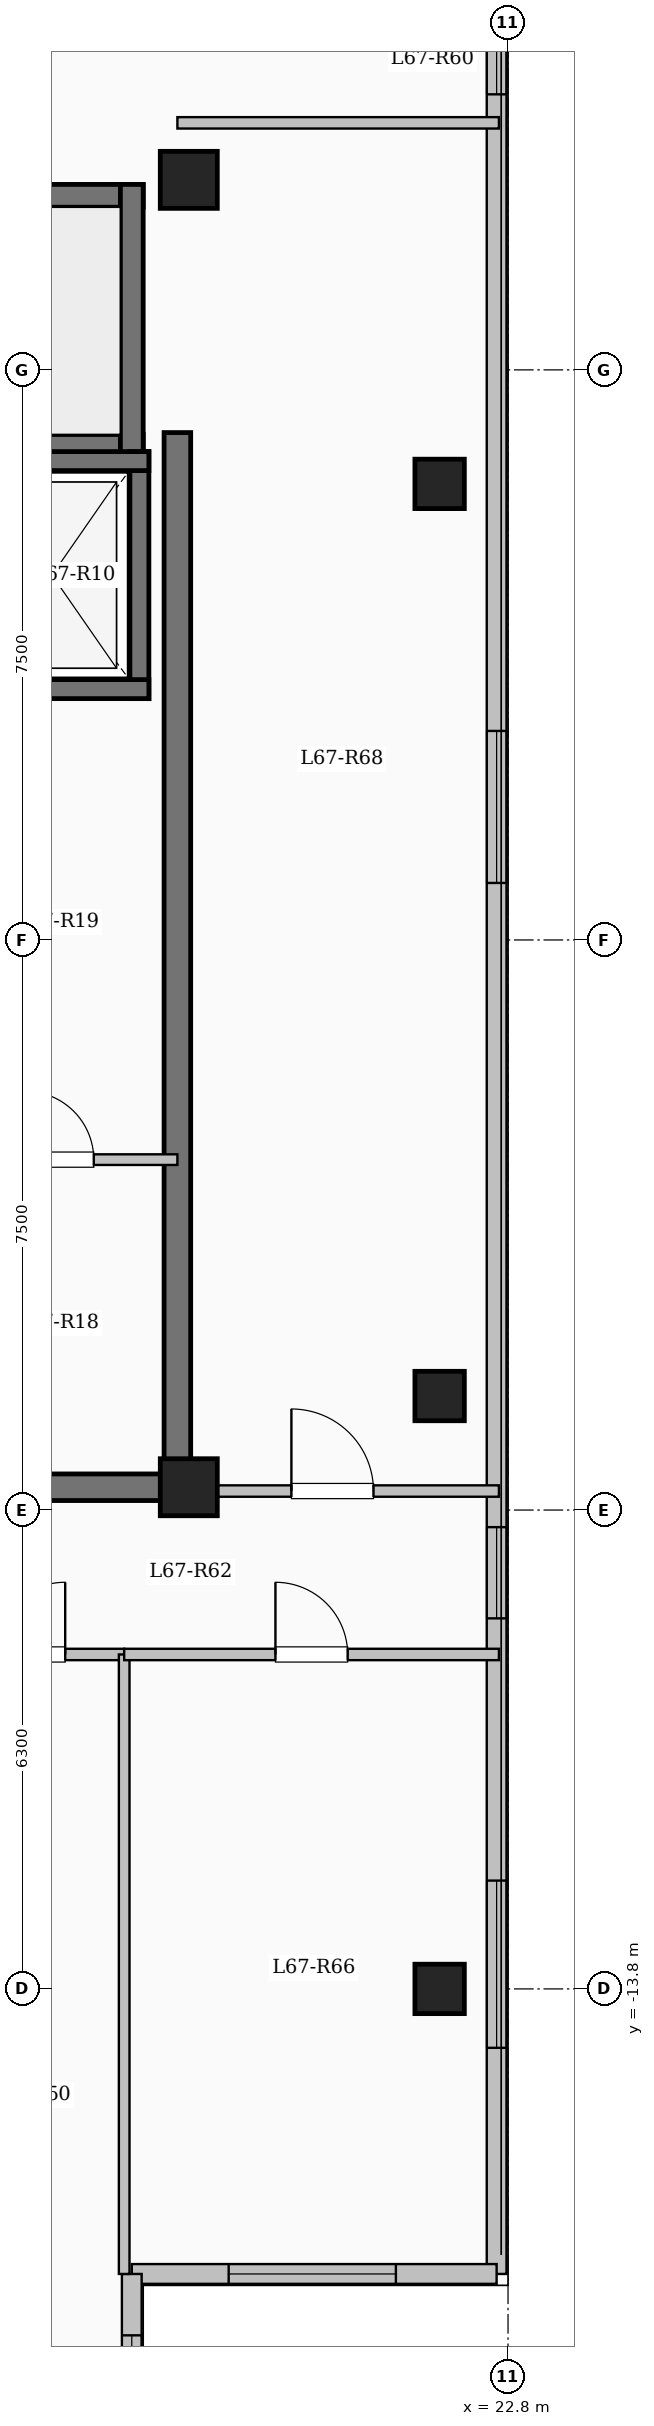
"""IFC4 building model, lengths in metres.
Left out: names, types, materials, properties, quantities, classifications, styles, units other than length and angle.
Written with IfcOpenShell. Run it as: python <this file> out.ifc"""

import sys

from ifc_helpers import new_model, si_unit, direction, frame, frame_2d, origin, origin_2d, place, context, subcontext, project, spatial, rectangle, extrude, element, fill, save


model = new_model("IFC4")
c1 = context("Model", 3, precision=1e-05, world=origin(), true_north=direction((0.0, 1.0)))
c2 = subcontext(c1, "Body", "Model", "MODEL_VIEW")
j1 = project(units=[si_unit("LENGTHUNIT", "METRE"), si_unit("PLANEANGLEUNIT", "RADIAN")], contexts=[c1])
p1 = place(None, origin())
s1 = spatial("IfcSite", under=j1, at=p1, CompositionType="ELEMENT")
p2 = place(p1, origin())
s2 = spatial("IfcBuilding", under=s1, at=p2, CompositionType="ELEMENT")
p3 = place(p2, frame((0.0, 0.0, 248.2)))
s3 = spatial("IfcBuildingStorey", under=s2, at=p3, CompositionType="ELEMENT", Elevation=248.2)
for number, where, z_axis, x_axis in (
    (1, (18.6, -7.2, 0.0), (0.0, 0.0, 1.0), (1.0, 0.0, 0.0)),
    (2, (18.6, 10.0, 0.0), (0.0, 0.0, 1.0), (1.0, 0.0, 0.0)),
):
    element("IfcColumn", number, at=place(p3, frame(where, z_axis=z_axis, x_axis=x_axis)), inside=s3, PredefinedType="COLUMN", context=c2, shape_type="SweptSolid", body=[
        extrude(rectangle(XDim=0.75, YDim=0.75, at=origin_2d()), origin(), (0.0, 0.0, 1.0), 3.35),
    ])
for number, where, z_axis, x_axis in (
    (3, (21.9, -13.8, 0.0), (0.0, 0.0, 1.0), (1.0, 0.0, 0.0)),
    (4, (21.9, -6.0, 0.0), (0.0, 0.0, 1.0), (1.0, 0.0, 0.0)),
    (5, (21.9, 6.0, 0.0), (0.0, 0.0, 1.0), (1.0, 0.0, 0.0)),
):
    element("IfcColumn", number, at=place(p3, frame(where, z_axis=z_axis, x_axis=x_axis)), inside=s3, PredefinedType="COLUMN", context=c2, shape_type="SweptSolid", body=[
        extrude(rectangle(XDim=0.65, YDim=0.65, at=origin_2d()), origin(), (0.0, 0.0, 1.0), 3.35),
    ])
p4 = place(p3, frame((22.65, 17.55, 0.0), z_axis=(0.0, 0.0, 1.0), x_axis=(0.0, -1.0, 0.0)))
e6 = element("IfcWall", 6, at=p4, inside=s3, PredefinedType="SOLIDWALL", context=c2, shape_type="SweptSolid", body=[
    extrude(rectangle(XDim=35.1, YDim=0.26, at=frame_2d((17.55, 0.0))), origin(), (0.0, 0.0, 1.0), 3.1),
])
p5 = place(p4, frame((1.525, 0.0, 0.9)))
e7 = element("IfcOpeningElement", 7, at=p5, cuts=e6, PredefinedType="OPENING", context=c2, shape_type="SweptSolid", body=[
    extrude(rectangle(XDim=2.0, YDim=1.7, at=frame_2d((1.0, 0.85))), frame((0.0, 0.14, 0.0), z_axis=(0.0, -1.0, 0.0), x_axis=(1.0, 0.0, 0.0)), (0.0, 0.0, 1.0), 0.28),
])
p6 = place(p4, frame((5.425, 0.0, 0.95)))
e8 = element("IfcOpeningElement", 8, at=p6, cuts=e6, PredefinedType="OPENING", context=c2, shape_type="SweptSolid", body=[
    extrude(rectangle(XDim=1.0, YDim=1.5, at=frame_2d((0.5, 0.75))), frame((0.0, 0.14, 0.0), z_axis=(0.0, -1.0, 0.0), x_axis=(1.0, 0.0, 0.0)), (0.0, 0.0, 1.0), 0.28),
])
p7 = place(p4, frame((14.8, 0.0, 0.9)))
e9 = element("IfcOpeningElement", 9, at=p7, cuts=e6, PredefinedType="OPENING", context=c2, shape_type="SweptSolid", body=[
    extrude(rectangle(XDim=2.0, YDim=1.7, at=frame_2d((1.0, 0.85))), frame((0.0, 0.14, 0.0), z_axis=(0.0, -1.0, 0.0), x_axis=(1.0, 0.0, 0.0)), (0.0, 0.0, 1.0), 0.28),
])
p8 = place(p4, frame((25.275, 0.0, 0.95)))
e10 = element("IfcOpeningElement", 10, at=p8, cuts=e6, PredefinedType="OPENING", context=c2, shape_type="SweptSolid", body=[
    extrude(rectangle(XDim=1.2, YDim=1.5, at=frame_2d((0.6, 0.75))), frame((0.0, 0.14, 0.0), z_axis=(0.0, -1.0, 0.0), x_axis=(1.0, 0.0, 0.0)), (0.0, 0.0, 1.0), 0.28),
])
p9 = place(p4, frame((29.925, 0.0, 0.9)))
e11 = element("IfcOpeningElement", 11, at=p9, cuts=e6, PredefinedType="OPENING", context=c2, shape_type="SweptSolid", body=[
    extrude(rectangle(XDim=2.2, YDim=1.75, at=frame_2d((1.1, 0.875))), frame((0.0, 0.14, 0.0), z_axis=(0.0, -1.0, 0.0), x_axis=(1.0, 0.0, 0.0)), (0.0, 0.0, 1.0), 0.28),
])
p10 = place(p3, frame((22.65, -17.55, 0.0), z_axis=(0.0, 0.0, 1.0), x_axis=(-1.0, 0.0, 0.0)))
e12 = element("IfcWall", 12, at=p10, inside=s3, PredefinedType="SOLIDWALL", context=c2, shape_type="SweptSolid", body=[
    extrude(rectangle(XDim=4.8, YDim=0.26, at=frame_2d((2.4, 0.0))), origin(), (0.0, 0.0, 1.0), 3.1),
])
p11 = place(p10, frame((1.325, 0.0, 0.9)))
e13 = element("IfcOpeningElement", 13, at=p11, cuts=e12, PredefinedType="OPENING", context=c2, shape_type="SweptSolid", body=[
    extrude(rectangle(XDim=2.2, YDim=1.75, at=frame_2d((1.1, 0.875))), frame((0.0, 0.14, 0.0), z_axis=(0.0, -1.0, 0.0), x_axis=(1.0, 0.0, 0.0)), (0.0, 0.0, 1.0), 0.28),
])
p12 = place(p3, frame((17.85, -17.55, 0.0), z_axis=(0.0, 0.0, 1.0), x_axis=(0.0, -1.0, 0.0)))
e14 = element("IfcWall", 14, at=p12, inside=s3, PredefinedType="SOLIDWALL", context=c2, shape_type="SweptSolid", body=[
    extrude(rectangle(XDim=3.3, YDim=0.26, at=frame_2d((1.65, 0.0))), origin(), (0.0, 0.0, 1.0), 3.1),
])
p13 = place(p12, frame((0.808, 0.0, 0.9)))
e15 = element("IfcOpeningElement", 15, at=p13, cuts=e14, PredefinedType="OPENING", context=c2, shape_type="SweptSolid", body=[
    extrude(rectangle(XDim=1.65, YDim=1.6, at=frame_2d((0.825, 0.8))), frame((0.0, 0.14, 0.0), z_axis=(0.0, -1.0, 0.0), x_axis=(1.0, 0.0, 0.0)), (0.0, 0.0, 1.0), 0.28),
])
p14 = place(p3, frame((10.0, 9.79, 0.0), z_axis=(0.0, 0.0, 1.0), x_axis=(1.0, 0.0, 0.0)))
e16 = element("IfcWall", 16, at=p14, inside=s3, PredefinedType="SHEAR", context=c2, shape_type="SweptSolid", body=[
    extrude(rectangle(XDim=8.0, YDim=0.3, at=frame_2d((4.0, 0.0))), origin(), (0.0, 0.0, 1.0), 3.35),
])
p15 = place(p3, frame((10.0, 6.5, 0.0), z_axis=(0.0, 0.0, 1.0), x_axis=(1.0, 0.0, 0.0)))
e17 = element("IfcWall", 17, at=p15, inside=s3, PredefinedType="SHEAR", context=c2, shape_type="SweptSolid", body=[
    extrude(rectangle(XDim=8.0, YDim=0.3, at=frame_2d((4.0, 0.0))), origin(), (0.0, 0.0, 1.0), 3.35),
])
p16 = place(p15, frame((0.55, 0.0, 0.0)))
e18 = element("IfcOpeningElement", 18, at=p16, cuts=e17, PredefinedType="OPENING", context=c2, shape_type="SweptSolid", body=[
    extrude(rectangle(XDim=1.0, YDim=2.15, at=frame_2d((0.5, 1.075))), frame((0.0, 0.16, 0.0), z_axis=(0.0, -1.0, 0.0), x_axis=(1.0, 0.0, 0.0)), (0.0, 0.0, 1.0), 0.32),
])
p17 = place(p3, frame((17.85, 6.35, 0.0), z_axis=(0.0, 0.0, 1.0), x_axis=(0.0, 1.0, 0.0)))
e19 = element("IfcWall", 19, at=p17, inside=s3, PredefinedType="SHEAR", context=c2, shape_type="SweptSolid", body=[
    extrude(rectangle(XDim=3.59, YDim=0.3, at=frame_2d((1.795, 0.0))), origin(), (0.0, 0.0, 1.0), 3.35),
])
p18 = place(p3, frame((17.95, 3.175, 0.0), z_axis=(0.0, 0.0, 1.0), x_axis=(0.0, 1.0, 0.0)))
e20 = element("IfcWall", 20, at=p18, inside=s3, PredefinedType="SHEAR", context=c2, shape_type="SweptSolid", body=[
    extrude(rectangle(XDim=3.25, YDim=0.25, at=frame_2d((1.625, 0.0))), origin(), (0.0, 0.0, 1.0), 3.35),
])
for number, where, z_axis, x_axis in (
    (21, (15.525, 3.3, 0.0), (0.0, 0.0, 1.0), (1.0, 0.0, 0.0)),
    (22, (15.525, 6.3, 0.0), (0.0, 0.0, 1.0), (1.0, 0.0, 0.0)),
):
    element("IfcWall", number, at=place(p3, frame(where, z_axis=z_axis, x_axis=x_axis)), inside=s3, PredefinedType="SHEAR", context=c2, shape_type="SweptSolid", body=[
        extrude(rectangle(XDim=2.55, YDim=0.25, at=frame_2d((1.275, 0.0))), origin(), (0.0, 0.0, 1.0), 3.35),
    ])
p19 = place(p3, frame((18.45, -7.375, 0.0), z_axis=(0.0, 0.0, 1.0), x_axis=(0.0, 1.0, 0.0)))
e23 = element("IfcWall", 23, at=p19, inside=s3, PredefinedType="SHEAR", context=c2, shape_type="SweptSolid", body=[
    extrude(rectangle(XDim=14.05, YDim=0.35, at=frame_2d((7.025, 0.0))), origin(), (0.0, 0.0, 1.0), 3.35),
])
p20 = place(p3, frame((12.625, -7.2, 0.0), z_axis=(0.0, 0.0, 1.0), x_axis=(1.0, 0.0, 0.0)))
e24 = element("IfcWall", 24, at=p20, inside=s3, PredefinedType="SHEAR", context=c2, shape_type="SweptSolid", body=[
    extrude(rectangle(XDim=6.0, YDim=0.35, at=frame_2d((3.0, 0.0))), origin(), (0.0, 0.0, 1.0), 3.35),
])
p21 = place(p3, frame((15.4, -2.89, 0.0), z_axis=(0.0, 0.0, 1.0), x_axis=(1.0, 0.0, 0.0)))
e25 = element("IfcWall", 25, at=p21, inside=s3, PredefinedType="PARTITIONING", context=c2, shape_type="SweptSolid", body=[
    extrude(rectangle(XDim=3.05, YDim=0.14, at=frame_2d((1.525, 0.0))), origin(), (0.0, 0.0, 1.0), 3.1),
])
p22 = place(p21, frame((1.05, 0.0, 0.0)))
e26 = element("IfcOpeningElement", 26, at=p22, cuts=e25, PredefinedType="OPENING", context=c2, shape_type="SweptSolid", body=[
    extrude(rectangle(XDim=0.9, YDim=2.08, at=frame_2d((0.45, 1.04))), frame((0.0, 0.08, 0.0), z_axis=(0.0, -1.0, 0.0), x_axis=(1.0, 0.0, 0.0)), (0.0, 0.0, 1.0), 0.16),
])
p23 = place(p3, frame((8.55, -9.4, 0.0), z_axis=(0.0, 0.0, 1.0), x_axis=(1.0, 0.0, 0.0)))
e27 = element("IfcWall", 27, at=p23, inside=s3, PredefinedType="PARTITIONING", context=c2, shape_type="SweptSolid", body=[
    extrude(rectangle(XDim=9.2, YDim=0.15, at=frame_2d((4.6, 0.0))), origin(), (0.0, 0.0, 1.0), 3.1),
])
p24 = place(p23, frame((1.192, 0.0, 0.0)))
e28 = element("IfcOpeningElement", 28, at=p24, cuts=e27, PredefinedType="OPENING", context=c2, shape_type="SweptSolid", body=[
    extrude(rectangle(XDim=0.95, YDim=2.15, at=frame_2d((0.475, 1.075))), frame((0.0, 0.085, 0.0), z_axis=(0.0, -1.0, 0.0), x_axis=(1.0, 0.0, 0.0)), (0.0, 0.0, 1.0), 0.17),
])
p25 = place(p23, frame((4.516, 0.0, 0.0)))
e29 = element("IfcOpeningElement", 29, at=p25, cuts=e27, PredefinedType="OPENING", context=c2, shape_type="SweptSolid", body=[
    extrude(rectangle(XDim=0.95, YDim=2.15, at=frame_2d((0.475, 1.075))), frame((0.0, 0.085, 0.0), z_axis=(0.0, -1.0, 0.0), x_axis=(1.0, 0.0, 0.0)), (0.0, 0.0, 1.0), 0.17),
])
p26 = place(p23, frame((7.474, 0.0, 0.0)))
e30 = element("IfcOpeningElement", 30, at=p26, cuts=e27, PredefinedType="OPENING", context=c2, shape_type="SweptSolid", body=[
    extrude(rectangle(XDim=0.95, YDim=2.15, at=frame_2d((0.475, 1.075))), frame((0.0, 0.085, 0.0), z_axis=(0.0, -1.0, 0.0), x_axis=(1.0, 0.0, 0.0)), (0.0, 0.0, 1.0), 0.17),
])
p27 = place(p3, frame((18.45, -7.25, 0.0), z_axis=(0.0, 0.0, 1.0), x_axis=(1.0, 0.0, 0.0)))
e31 = element("IfcWall", 31, at=p27, inside=s3, PredefinedType="PARTITIONING", context=c2, shape_type="SweptSolid", body=[
    extrude(rectangle(XDim=4.23, YDim=0.15, at=frame_2d((2.115, 0.0))), origin(), (0.0, 0.0, 1.0), 3.1),
])
p28 = place(p27, frame((1.5, 0.0, 0.0)))
e32 = element("IfcOpeningElement", 32, at=p28, cuts=e31, PredefinedType="OPENING", context=c2, shape_type="SweptSolid", body=[
    extrude(rectangle(XDim=1.08, YDim=2.15, at=frame_2d((0.54, 1.075))), frame((0.0, 0.085, 0.0), z_axis=(0.0, -1.0, 0.0), x_axis=(1.0, 0.0, 0.0)), (0.0, 0.0, 1.0), 0.17),
])
p29 = place(p3, frame((18.45, 10.75, 0.0), z_axis=(0.0, 0.0, 1.0), x_axis=(1.0, 0.0, 0.0)))
e33 = element("IfcWall", 33, at=p29, inside=s3, PredefinedType="PARTITIONING", context=c2, shape_type="SweptSolid", body=[
    extrude(rectangle(XDim=4.23, YDim=0.15, at=frame_2d((2.115, 0.0))), origin(), (0.0, 0.0, 1.0), 3.1),
])
p30 = place(p3, frame((17.75, -17.55, 0.0), z_axis=(0.0, 0.0, 1.0), x_axis=(0.0, 1.0, 0.0)))
e34 = element("IfcWall", 34, at=p30, inside=s3, PredefinedType="PARTITIONING", context=c2, shape_type="SweptSolid", body=[
    extrude(rectangle(XDim=8.15, YDim=0.14, at=frame_2d((4.075, 0.0))), origin(), (0.0, 0.0, 1.0), 3.1),
])
p31 = place(p3, frame((17.75, -9.4, 0.0), z_axis=(0.0, 0.0, 1.0), x_axis=(1.0, 0.0, 0.0)))
e35 = element("IfcWall", 35, at=p31, inside=s3, PredefinedType="PARTITIONING", context=c2, shape_type="SweptSolid", body=[
    extrude(rectangle(XDim=4.93, YDim=0.15, at=frame_2d((2.465, 0.0))), origin(), (0.0, 0.0, 1.0), 3.1),
])
p32 = place(p31, frame((1.99, 0.0, 0.0)))
e36 = element("IfcOpeningElement", 36, at=p32, cuts=e35, PredefinedType="OPENING", context=c2, shape_type="SweptSolid", body=[
    extrude(rectangle(XDim=0.95, YDim=2.15, at=frame_2d((0.475, 1.075))), frame((0.0, 0.085, 0.0), z_axis=(0.0, -1.0, 0.0), x_axis=(1.0, 0.0, 0.0)), (0.0, 0.0, 1.0), 0.17),
])
p33 = place(p6, origin())
e37 = element("IfcWindow", 37, at=p33, inside=s3, PartitioningType="SINGLE_PANEL", PredefinedType="WINDOW", context=c2, shape_type="SweptSolid", body=[
    extrude(rectangle(XDim=1.0, YDim=1.5, at=frame_2d((0.5, 0.75))), frame((0.0, 0.03, 0.0), z_axis=(0.0, -1.0, 0.0), x_axis=(1.0, 0.0, 0.0)), (0.0, 0.0, 1.0), 0.06),
])
fill(e8, e37)
p34 = place(p7, origin())
e38 = element("IfcWindow", 38, at=p34, inside=s3, PartitioningType="SINGLE_PANEL", PredefinedType="WINDOW", context=c2, shape_type="SweptSolid", body=[
    extrude(rectangle(XDim=2.0, YDim=1.7, at=frame_2d((1.0, 0.85))), frame((0.0, 0.03, 0.0), z_axis=(0.0, -1.0, 0.0), x_axis=(1.0, 0.0, 0.0)), (0.0, 0.0, 1.0), 0.06),
])
fill(e9, e38)
p35 = place(p8, origin())
e39 = element("IfcWindow", 39, at=p35, inside=s3, PartitioningType="SINGLE_PANEL", PredefinedType="WINDOW", context=c2, shape_type="SweptSolid", body=[
    extrude(rectangle(XDim=1.2, YDim=1.5, at=frame_2d((0.6, 0.75))), frame((0.0, 0.03, 0.0), z_axis=(0.0, -1.0, 0.0), x_axis=(1.0, 0.0, 0.0)), (0.0, 0.0, 1.0), 0.06),
])
fill(e10, e39)
p36 = place(p9, origin())
e40 = element("IfcWindow", 40, at=p36, inside=s3, PartitioningType="SINGLE_PANEL", PredefinedType="WINDOW", context=c2, shape_type="SweptSolid", body=[
    extrude(rectangle(XDim=2.2, YDim=1.75, at=frame_2d((1.1, 0.875))), frame((0.0, 0.03, 0.0), z_axis=(0.0, -1.0, 0.0), x_axis=(1.0, 0.0, 0.0)), (0.0, 0.0, 1.0), 0.06),
])
fill(e11, e40)
p37 = place(p11, origin())
e41 = element("IfcWindow", 41, at=p37, inside=s3, PartitioningType="SINGLE_PANEL", PredefinedType="WINDOW", context=c2, shape_type="SweptSolid", body=[
    extrude(rectangle(XDim=2.2, YDim=1.75, at=frame_2d((1.1, 0.875))), frame((0.0, 0.03, 0.0), z_axis=(0.0, -1.0, 0.0), x_axis=(1.0, 0.0, 0.0)), (0.0, 0.0, 1.0), 0.06),
])
fill(e13, e41)
p38 = place(p13, origin())
e42 = element("IfcWindow", 42, at=p38, inside=s3, PartitioningType="SINGLE_PANEL", PredefinedType="WINDOW", context=c2, shape_type="SweptSolid", body=[
    extrude(rectangle(XDim=1.65, YDim=1.6, at=frame_2d((0.825, 0.8))), frame((0.0, 0.03, 0.0), z_axis=(0.0, -1.0, 0.0), x_axis=(1.0, 0.0, 0.0)), (0.0, 0.0, 1.0), 0.06),
])
fill(e15, e42)
p39 = place(p22, origin())
e43 = element("IfcDoor", 43, at=p39, inside=s3, OperationType="SINGLE_SWING_LEFT", PredefinedType="DOOR", context=c2, shape_type="SweptSolid", body=[
    extrude(rectangle(XDim=0.9, YDim=2.08, at=frame_2d((0.45, 1.04))), frame((0.0, 0.025, 0.0), z_axis=(0.0, -1.0, 0.0), x_axis=(1.0, 0.0, 0.0)), (0.0, 0.0, 1.0), 0.05),
])
fill(e26, e43)
p40 = place(p26, origin())
e44 = element("IfcDoor", 44, at=p40, inside=s3, OperationType="SINGLE_SWING_RIGHT", PredefinedType="DOOR", context=c2, shape_type="SweptSolid", body=[
    extrude(rectangle(XDim=0.95, YDim=2.15, at=frame_2d((0.475, 1.075))), frame((0.0, 0.025, 0.0), z_axis=(0.0, -1.0, 0.0), x_axis=(1.0, 0.0, 0.0)), (0.0, 0.0, 1.0), 0.05),
])
fill(e30, e44)
p41 = place(p32, origin())
e45 = element("IfcDoor", 45, at=p41, inside=s3, OperationType="SINGLE_SWING_LEFT", PredefinedType="DOOR", context=c2, shape_type="SweptSolid", body=[
    extrude(rectangle(XDim=0.95, YDim=2.15, at=frame_2d((0.475, 1.075))), frame((0.0, 0.025, 0.0), z_axis=(0.0, -1.0, 0.0), x_axis=(1.0, 0.0, 0.0)), (0.0, 0.0, 1.0), 0.05),
])
fill(e36, e45)
p42 = place(p28, origin())
e46 = element("IfcDoor", 46, at=p42, inside=s3, OperationType="SINGLE_SWING_LEFT", PredefinedType="DOOR", context=c2, shape_type="SweptSolid", body=[
    extrude(rectangle(XDim=1.08, YDim=2.15, at=frame_2d((0.54, 1.075))), frame((0.0, 0.025, 0.0), z_axis=(0.0, -1.0, 0.0), x_axis=(1.0, 0.0, 0.0)), (0.0, 0.0, 1.0), 0.05),
])
fill(e32, e46)
save(model, sys.argv[1])
